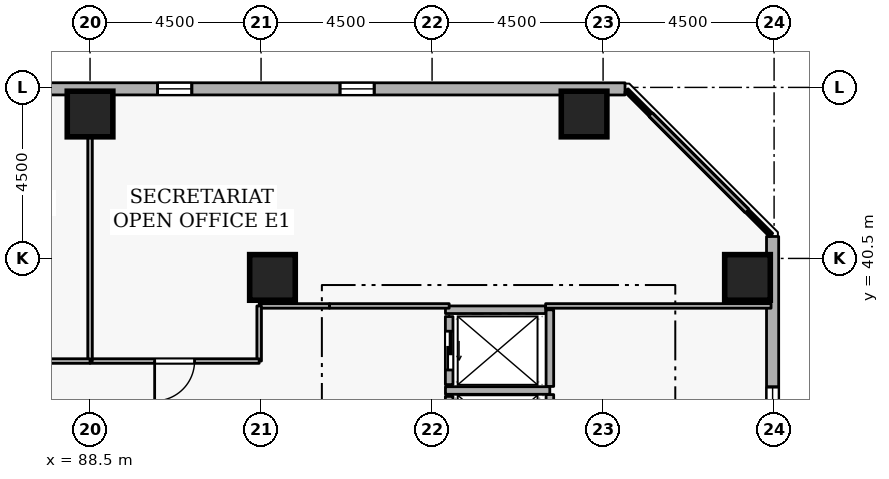
"""IFC4 building model, lengths in metres.
Left out: names, types, materials, properties, quantities, classifications, styles, units other than length and angle.
Written with IfcOpenShell. Run it as: python <this file> out.ifc"""

import sys

from ifc_helpers import new_model, si_unit, direction, frame, frame_2d, origin, origin_2d, place, context, subcontext, project, spatial, rectangle, extrude, element, fill, save


model = new_model("IFC4")
c1 = context("Model", 3, precision=1e-05, world=origin(), true_north=direction((0.0, 1.0)))
c2 = subcontext(c1, "Body", "Model", "MODEL_VIEW")
j1 = project(units=[si_unit("LENGTHUNIT", "METRE"), si_unit("PLANEANGLEUNIT", "RADIAN")], contexts=[c1])
p1 = place(None, origin())
s1 = spatial("IfcSite", under=j1, at=p1, CompositionType="ELEMENT")
p2 = place(p1, origin())
s2 = spatial("IfcBuilding", under=s1, at=p2, CompositionType="ELEMENT")
p3 = place(p2, frame((0.0, 0.0, 101.7)))
s3 = spatial("IfcBuildingStorey", under=s2, at=p3, CompositionType="ELEMENT", Elevation=101.7)
for number, where, z_axis, x_axis in (
    (1, (105.8, 40.0, 0.0), (0.0, 0.0, 1.0), (1.0, 0.0, 0.0)),
    (2, (101.5, 44.3, 0.0), (0.0, 0.0, 1.0), (1.0, 0.0, 0.0)),
    (3, (88.5, 44.3, 0.0), (0.0, 0.0, 1.0), (1.0, 0.0, 0.0)),
    (4, (93.3, 40.0, 0.0), (0.0, 0.0, 1.0), (1.0, 0.0, 0.0)),
):
    element("IfcColumn", number, at=place(p3, frame(where, z_axis=z_axis, x_axis=x_axis)), inside=s3, PredefinedType="COLUMN", context=c2, shape_type="SweptSolid", body=[
        extrude(rectangle(XDim=1.2, YDim=1.2, at=origin_2d()), origin(), (0.0, 0.0, 1.0), 3.6),
    ])
p4 = place(p3, frame((106.465, 5.619, 0.0), z_axis=(0.0, 0.0, 1.0), x_axis=(-0.00011704845, 0.99999999315, 0.0)))
e5 = element("IfcWall", 5, at=p4, inside=s3, PredefinedType="STANDARD", context=c2, shape_type="SweptSolid", body=[
    extrude(rectangle(XDim=35.459, YDim=0.32, at=frame_2d((17.729, 0.0))), origin(), (0.0, 0.0, 1.0), 2.7),
])
p5 = place(p4, frame((1.8, 0.0, 0.72)))
e6 = element("IfcOpeningElement", 6, at=p5, cuts=e5, PredefinedType="OPENING", context=c2, shape_type="SweptSolid", body=[
    extrude(rectangle(XDim=0.9, YDim=1.75, at=frame_2d((0.45, 0.875))), frame((0.0, 0.17, 0.0), z_axis=(0.0, -1.0, 0.0), x_axis=(1.0, 0.0, 0.0)), (0.0, 0.0, 1.0), 0.34),
])
p6 = place(p4, frame((11.4, 0.0, 0.72)))
e7 = element("IfcOpeningElement", 7, at=p6, cuts=e5, PredefinedType="OPENING", context=c2, shape_type="SweptSolid", body=[
    extrude(rectangle(XDim=0.9, YDim=1.75, at=frame_2d((0.45, 0.875))), frame((0.0, 0.17, 0.0), z_axis=(0.0, -1.0, 0.0), x_axis=(1.0, 0.0, 0.0)), (0.0, 0.0, 1.0), 0.34),
])
p7 = place(p4, frame((16.2, 0.0, 0.72)))
e8 = element("IfcOpeningElement", 8, at=p7, cuts=e5, PredefinedType="OPENING", context=c2, shape_type="SweptSolid", body=[
    extrude(rectangle(XDim=0.9, YDim=1.75, at=frame_2d((0.45, 0.875))), frame((0.0, 0.17, 0.0), z_axis=(0.0, -1.0, 0.0), x_axis=(1.0, 0.0, 0.0)), (0.0, 0.0, 1.0), 0.34),
])
p8 = place(p4, frame((25.8, 0.0, 0.72)))
e9 = element("IfcOpeningElement", 9, at=p8, cuts=e5, PredefinedType="OPENING", context=c2, shape_type="SweptSolid", body=[
    extrude(rectangle(XDim=0.9, YDim=1.75, at=frame_2d((0.45, 0.875))), frame((0.0, 0.17, 0.0), z_axis=(0.0, -1.0, 0.0), x_axis=(1.0, 0.0, 0.0)), (0.0, 0.0, 1.0), 0.34),
])
p9 = place(p4, frame((30.6, 0.0, 0.72)))
e10 = element("IfcOpeningElement", 10, at=p9, cuts=e5, PredefinedType="OPENING", context=c2, shape_type="SweptSolid", body=[
    extrude(rectangle(XDim=0.9, YDim=1.75, at=frame_2d((0.45, 0.875))), frame((0.0, 0.17, 0.0), z_axis=(0.0, -1.0, 0.0), x_axis=(1.0, 0.0, 0.0)), (0.0, 0.0, 1.0), 0.34),
])
p10 = place(p3, frame((102.577, 44.96, 0.0), z_axis=(0.0, 0.0, 1.0), x_axis=(-0.99999999315, 0.00011704845, 0.0)))
e11 = element("IfcWall", 11, at=p10, inside=s3, PredefinedType="STANDARD", context=c2, shape_type="SweptSolid", body=[
    extrude(rectangle(XDim=35.459, YDim=0.32, at=frame_2d((17.729, 0.0))), origin(), (0.0, 0.0, 1.0), 2.7),
])
p11 = place(p10, frame((6.6, 0.0, 0.72)))
e12 = element("IfcOpeningElement", 12, at=p11, cuts=e11, PredefinedType="OPENING", context=c2, shape_type="SweptSolid", body=[
    extrude(rectangle(XDim=0.9, YDim=1.75, at=frame_2d((0.45, 0.875))), frame((0.0, 0.17, 0.0), z_axis=(0.0, -1.0, 0.0), x_axis=(1.0, 0.0, 0.0)), (0.0, 0.0, 1.0), 0.34),
])
p12 = place(p10, frame((11.4, 0.0, 0.72)))
e13 = element("IfcOpeningElement", 13, at=p12, cuts=e11, PredefinedType="OPENING", context=c2, shape_type="SweptSolid", body=[
    extrude(rectangle(XDim=0.9, YDim=1.75, at=frame_2d((0.45, 0.875))), frame((0.0, 0.17, 0.0), z_axis=(0.0, -1.0, 0.0), x_axis=(1.0, 0.0, 0.0)), (0.0, 0.0, 1.0), 0.34),
])
p13 = place(p10, frame((16.2, 0.0, 0.72)))
e14 = element("IfcOpeningElement", 14, at=p13, cuts=e11, PredefinedType="OPENING", context=c2, shape_type="SweptSolid", body=[
    extrude(rectangle(XDim=0.9, YDim=1.75, at=frame_2d((0.45, 0.875))), frame((0.0, 0.17, 0.0), z_axis=(0.0, -1.0, 0.0), x_axis=(1.0, 0.0, 0.0)), (0.0, 0.0, 1.0), 0.34),
])
p14 = place(p10, frame((21.0, 0.0, 0.72)))
e15 = element("IfcOpeningElement", 15, at=p14, cuts=e11, PredefinedType="OPENING", context=c2, shape_type="SweptSolid", body=[
    extrude(rectangle(XDim=0.9, YDim=1.75, at=frame_2d((0.45, 0.875))), frame((0.0, 0.17, 0.0), z_axis=(0.0, -1.0, 0.0), x_axis=(1.0, 0.0, 0.0)), (0.0, 0.0, 1.0), 0.34),
])
p15 = place(p10, frame((30.6, 0.0, 0.72)))
e16 = element("IfcOpeningElement", 16, at=p15, cuts=e11, PredefinedType="OPENING", context=c2, shape_type="SweptSolid", body=[
    extrude(rectangle(XDim=0.9, YDim=1.75, at=frame_2d((0.45, 0.875))), frame((0.0, 0.17, 0.0), z_axis=(0.0, -1.0, 0.0), x_axis=(1.0, 0.0, 0.0)), (0.0, 0.0, 1.0), 0.34),
])
p16 = place(p3, frame((97.95, 36.87, 0.0), z_axis=(0.0, 0.0, 1.0), x_axis=(0.0, -1.0, 0.0)))
e17 = element("IfcWall", 17, at=p16, inside=s3, PredefinedType="STANDARD", context=c2, shape_type="SweptSolid", body=[
    extrude(rectangle(XDim=1.74, YDim=0.2, at=frame_2d((0.87, 0.0))), origin(), (0.0, 0.0, 1.0), 3.34),
])
p17 = place(p16, frame((0.36, 0.0, 0.0)))
e18 = element("IfcOpeningElement", 18, at=p17, cuts=e17, PredefinedType="OPENING", context=c2, shape_type="SweptSolid", body=[
    extrude(rectangle(XDim=1.02, YDim=2.06, at=frame_2d((0.51, 1.03))), frame((0.0, 0.11, 0.0), z_axis=(0.0, -1.0, 0.0), x_axis=(1.0, 0.0, 0.0)), (0.0, 0.0, 1.0), 0.22),
])
p18 = place(p3, frame((97.95, 38.97, 0.0), z_axis=(0.0, 0.0, 1.0), x_axis=(0.0, -1.0, 0.0)))
e19 = element("IfcWall", 19, at=p18, inside=s3, PredefinedType="STANDARD", context=c2, shape_type="SweptSolid", body=[
    extrude(rectangle(XDim=1.79, YDim=0.2, at=frame_2d((0.895, 0.0))), origin(), (0.0, 0.0, 1.0), 3.34),
])
p19 = place(p18, frame((0.385, 0.0, 0.0)))
e20 = element("IfcOpeningElement", 20, at=p19, cuts=e19, PredefinedType="OPENING", context=c2, shape_type="SweptSolid", body=[
    extrude(rectangle(XDim=1.02, YDim=2.06, at=frame_2d((0.51, 1.03))), frame((0.0, 0.11, 0.0), z_axis=(0.0, -1.0, 0.0), x_axis=(1.0, 0.0, 0.0)), (0.0, 0.0, 1.0), 0.22),
])
p20 = place(p3, frame((97.852, 37.025, 0.0), z_axis=(0.0, 0.0, 1.0), x_axis=(1.0, 0.0, 0.0)))
e21 = element("IfcWall", 21, at=p20, inside=s3, PredefinedType="STANDARD", context=c2, shape_type="SweptSolid", body=[
    extrude(rectangle(XDim=2.746, YDim=0.2, at=frame_2d((1.373, 0.0))), origin(), (0.0, 0.0, 1.0), 3.34),
])
p21 = place(p3, frame((100.6, 35.062, 0.0), z_axis=(0.0, 0.0, 1.0), x_axis=(0.0, 1.0, 0.0)))
e22 = element("IfcWall", 22, at=p21, inside=s3, PredefinedType="STANDARD", context=c2, shape_type="SweptSolid", body=[
    extrude(rectangle(XDim=1.856, YDim=0.2, at=frame_2d((0.928, 0.0))), origin(), (0.0, 0.0, 1.0), 3.34),
])
p22 = place(p3, frame((100.6, 37.132, 0.0), z_axis=(0.0, 0.0, 1.0), x_axis=(0.0, 1.0, 0.0)))
e23 = element("IfcWall", 23, at=p22, inside=s3, PredefinedType="STANDARD", context=c2, shape_type="SweptSolid", body=[
    extrude(rectangle(XDim=2.016, YDim=0.2, at=frame_2d((1.008, 0.0))), origin(), (0.0, 0.0, 1.0), 3.34),
])
p23 = place(p3, frame((97.852, 39.15, 0.0), z_axis=(0.0, 0.0, 1.0), x_axis=(1.0, 0.0, 0.0)))
e24 = element("IfcWall", 24, at=p23, inside=s3, PredefinedType="STANDARD", context=c2, shape_type="SweptSolid", body=[
    extrude(rectangle(XDim=2.636, YDim=0.2, at=frame_2d((1.318, 0.0))), origin(), (0.0, 0.0, 1.0), 3.34),
])
p24 = place(p3, frame((106.42, 39.25, 0.0), z_axis=(0.0, 0.0, 1.0), x_axis=(-1.0, 0.0, 0.0)))
e25 = element("IfcWall", 25, at=p24, inside=s3, PredefinedType="PARTITIONING", context=c2, shape_type="SweptSolid", body=[
    extrude(rectangle(XDim=5.932, YDim=0.12, at=frame_2d((2.966, 0.0))), origin(), (0.0, 0.0, 1.0), 3.34),
])
p25 = place(p3, frame((97.95, 39.25, 0.0), z_axis=(0.0, 0.0, 1.0), x_axis=(-1.0, 0.0, 0.0)))
e26 = element("IfcWall", 26, at=p25, inside=s3, PredefinedType="PARTITIONING", context=c2, shape_type="SweptSolid", body=[
    extrude(rectangle(XDim=3.15, YDim=0.12, at=frame_2d((1.575, 0.0))), origin(), (0.0, 0.0, 1.0), 3.34),
])
p26 = place(p3, frame((94.8, 39.25, 0.0), z_axis=(0.0, 0.0, 1.0), x_axis=(-1.0, 0.0, 0.0)))
e27 = element("IfcWall", 27, at=p26, inside=s3, PredefinedType="PARTITIONING", context=c2, shape_type="SweptSolid", body=[
    extrude(rectangle(XDim=1.85, YDim=0.12, at=frame_2d((0.925, 0.0))), origin(), (0.0, 0.0, 1.0), 3.34),
])
p27 = place(p3, frame((92.95, 39.25, 0.0), z_axis=(0.0, 0.0, 1.0), x_axis=(0.0, -1.0, 0.0)))
e28 = element("IfcWall", 28, at=p27, inside=s3, PredefinedType="PARTITIONING", context=c2, shape_type="SweptSolid", body=[
    extrude(rectangle(XDim=1.45, YDim=0.12, at=frame_2d((0.725, 0.0))), origin(), (0.0, 0.0, 1.0), 3.34),
])
p28 = place(p3, frame((92.95, 37.8, 0.0), z_axis=(0.0, 0.0, 1.0), x_axis=(-1.0, 0.0, 0.0)))
e29 = element("IfcWall", 29, at=p28, inside=s3, PredefinedType="PARTITIONING", context=c2, shape_type="SweptSolid", body=[
    extrude(rectangle(XDim=4.45, YDim=0.12, at=frame_2d((2.225, 0.0))), origin(), (0.0, 0.0, 1.0), 3.34),
])
p29 = place(p28, frame((1.7, 0.0, 0.0)))
e30 = element("IfcOpeningElement", 30, at=p29, cuts=e29, PredefinedType="OPENING", context=c2, shape_type="SweptSolid", body=[
    extrude(rectangle(XDim=1.05, YDim=2.1, at=frame_2d((0.525, 1.05))), frame((0.0, 0.07, 0.0), z_axis=(0.0, -1.0, 0.0), x_axis=(1.0, 0.0, 0.0)), (0.0, 0.0, 1.0), 0.14),
])
p30 = place(p3, frame((88.5, 37.8, 0.0), z_axis=(0.0, 0.0, 1.0), x_axis=(0.0, 1.0, 0.0)))
e31 = element("IfcWall", 31, at=p30, inside=s3, PredefinedType="PARTITIONING", context=c2, shape_type="SweptSolid", body=[
    extrude(rectangle(XDim=7.12, YDim=0.12, at=frame_2d((3.56, 0.0))), origin(), (0.0, 0.0, 1.0), 2.878),
])
p31 = place(p3, frame((102.616, 44.92, 0.0), z_axis=(0.0, 0.0, 1.0), x_axis=(0.707106781187, -0.707106781187, 0.0)))
e32 = element("IfcWall", 32, at=p31, inside=s3, PredefinedType="PARTITIONING", context=c2, shape_type="SweptSolid", body=[
    extrude(rectangle(XDim=5.379, YDim=0.12, at=frame_2d((2.689, 0.0))), origin(), (0.0, 0.0, 1.0), 3.34),
])
p32 = place(p3, frame((88.5, 37.8, 0.0), z_axis=(0.0, 0.0, 1.0), x_axis=(-1.0, 0.0, 0.0)))
e33 = element("IfcWall", 33, at=p32, inside=s3, PredefinedType="PARTITIONING", context=c2, shape_type="SweptSolid", body=[
    extrude(rectangle(XDim=4.45, YDim=0.12, at=frame_2d((2.225, 0.0))), origin(), (0.0, 0.0, 1.0), 3.34),
])
p33 = place(p9, origin())
e34 = element("IfcWindow", 34, at=p33, inside=s3, PartitioningType="SINGLE_PANEL", PredefinedType="WINDOW", context=c2, shape_type="SweptSolid", body=[
    extrude(rectangle(XDim=0.9, YDim=1.75, at=frame_2d((0.45, 0.875))), frame((0.0, 0.03, 0.0), z_axis=(0.0, -1.0, 0.0), x_axis=(1.0, 0.0, 0.0)), (0.0, 0.0, 1.0), 0.06),
])
fill(e10, e34)
p34 = place(p11, origin())
e35 = element("IfcWindow", 35, at=p34, inside=s3, PartitioningType="SINGLE_PANEL", PredefinedType="WINDOW", context=c2, shape_type="SweptSolid", body=[
    extrude(rectangle(XDim=0.9, YDim=1.75, at=frame_2d((0.45, 0.875))), frame((0.0, 0.03, 0.0), z_axis=(0.0, -1.0, 0.0), x_axis=(1.0, 0.0, 0.0)), (0.0, 0.0, 1.0), 0.06),
])
fill(e12, e35)
p35 = place(p12, origin())
e36 = element("IfcWindow", 36, at=p35, inside=s3, PartitioningType="SINGLE_PANEL", PredefinedType="WINDOW", context=c2, shape_type="SweptSolid", body=[
    extrude(rectangle(XDim=0.9, YDim=1.75, at=frame_2d((0.45, 0.875))), frame((0.0, 0.03, 0.0), z_axis=(0.0, -1.0, 0.0), x_axis=(1.0, 0.0, 0.0)), (0.0, 0.0, 1.0), 0.06),
])
fill(e13, e36)
p36 = place(p19, origin())
e37 = element("IfcDoor", 37, at=p36, inside=s3, OperationType="SLIDING_TO_LEFT", PredefinedType="DOOR", context=c2, shape_type="SweptSolid", body=[
    extrude(rectangle(XDim=1.02, YDim=2.06, at=frame_2d((0.51, 1.03))), frame((0.0, 0.025, 0.0), z_axis=(0.0, -1.0, 0.0), x_axis=(1.0, 0.0, 0.0)), (0.0, 0.0, 1.0), 0.05),
])
fill(e20, e37)
p37 = place(p29, origin())
e38 = element("IfcDoor", 38, at=p37, inside=s3, OperationType="SINGLE_SWING_RIGHT", PredefinedType="DOOR", context=c2, shape_type="SweptSolid", body=[
    extrude(rectangle(XDim=1.05, YDim=2.1, at=frame_2d((0.525, 1.05))), frame((0.0, 0.025, 0.0), z_axis=(0.0, -1.0, 0.0), x_axis=(1.0, 0.0, 0.0)), (0.0, 0.0, 1.0), 0.05),
])
fill(e30, e38)
save(model, sys.argv[1])
